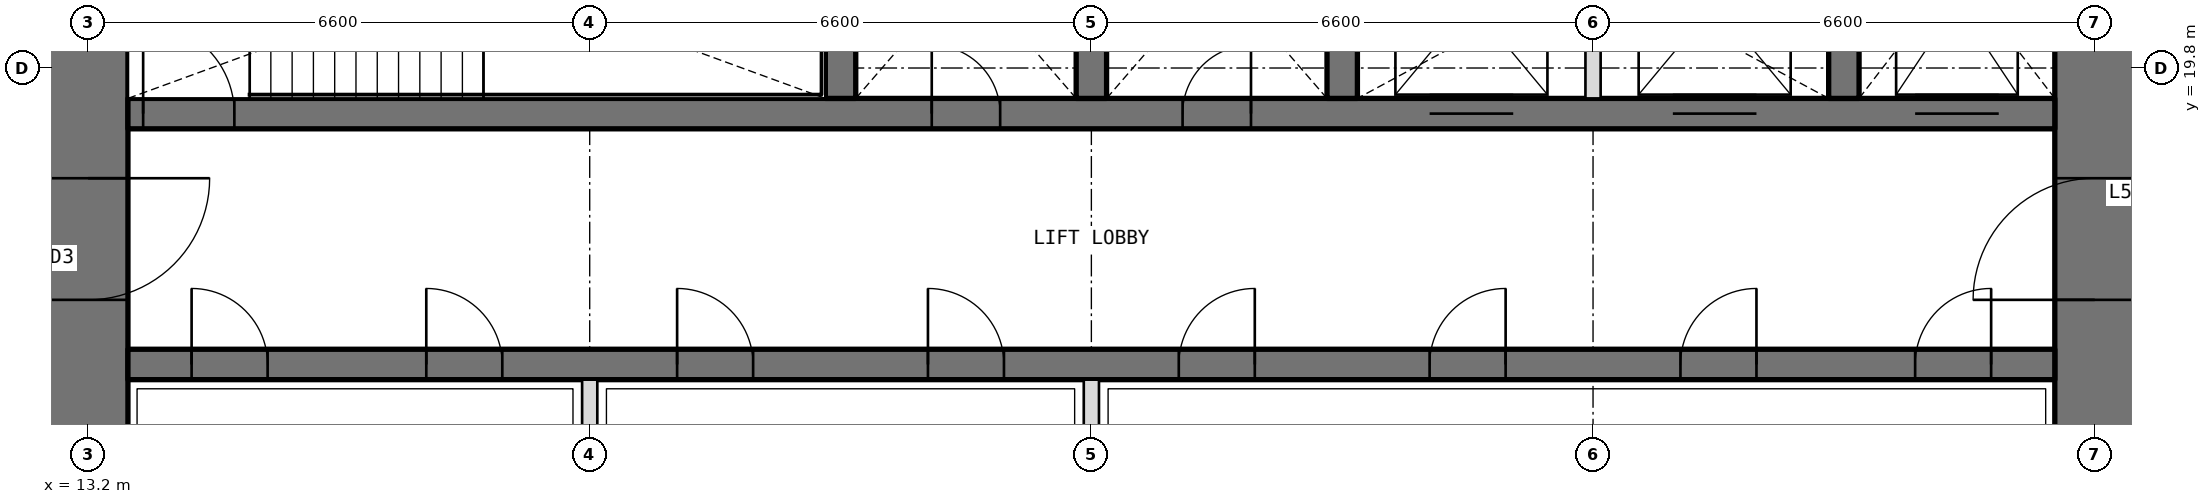
"""IFC4 building model, lengths in metres.
Left out: names, types, materials, properties, quantities, classifications, styles, units other than length and angle.
Written with IfcOpenShell. Run it as: python <this file> out.ifc"""

import sys

from ifc_helpers import new_model, si_unit, direction, frame, frame_2d, origin, place, context, subcontext, project, spatial, rectangle, extrude, element, fill, save


model = new_model("IFC4")
c1 = context("Model", 3, precision=1e-05, world=origin(), true_north=direction((0.0, 1.0)))
c2 = subcontext(c1, "Body", "Model", "MODEL_VIEW")
j1 = project(units=[si_unit("LENGTHUNIT", "METRE"), si_unit("PLANEANGLEUNIT", "RADIAN")], contexts=[c1])
p1 = place(None, origin())
s1 = spatial("IfcSite", under=j1, at=p1, CompositionType="ELEMENT")
p2 = place(p1, origin())
s2 = spatial("IfcBuilding", under=s1, at=p2, CompositionType="ELEMENT")
p3 = place(p2, frame((0.0, 0.0, 250.2)))
s3 = spatial("IfcBuildingStorey", under=s2, at=p3, CompositionType="ELEMENT", Elevation=250.2)
p4 = place(p3, frame((39.6, 13.725, 0.0), z_axis=(0.0, 0.0, 1.0), x_axis=(0.0, 1.0, 0.0)))
e1 = element("IfcWall", 1, at=p4, inside=s3, PredefinedType="SHEAR", context=c2, shape_type="SweptSolid", body=[
    extrude(rectangle(XDim=18.75, YDim=1.05, at=frame_2d((9.375, 0.0))), origin(), (0.0, 0.0, 1.0), 4.2),
])
p5 = place(p4, frame((3.025, 0.0, 0.0)))
e2 = element("IfcOpeningElement", 2, at=p5, cuts=e1, PredefinedType="OPENING", context=c2, shape_type="SweptSolid", body=[
    extrude(rectangle(XDim=1.6, YDim=2.1, at=frame_2d((0.8, 1.05))), frame((0.0, 0.535, 0.0), z_axis=(0.0, -1.0, 0.0), x_axis=(1.0, 0.0, 0.0)), (0.0, 0.0, 1.0), 1.07),
])
p6 = place(p4, frame((13.825, 0.0, 0.0)))
e3 = element("IfcOpeningElement", 3, at=p6, cuts=e1, PredefinedType="OPENING", context=c2, shape_type="SweptSolid", body=[
    extrude(rectangle(XDim=1.6, YDim=2.1, at=frame_2d((0.8, 1.05))), frame((0.0, 0.535, 0.0), z_axis=(0.0, -1.0, 0.0), x_axis=(1.0, 0.0, 0.0)), (0.0, 0.0, 1.0), 1.07),
])
p7 = place(p3, frame((13.2, 32.475, 0.0), z_axis=(0.0, 0.0, 1.0), x_axis=(0.0, -1.0, 0.0)))
e4 = element("IfcWall", 4, at=p7, inside=s3, PredefinedType="SHEAR", context=c2, shape_type="SweptSolid", body=[
    extrude(rectangle(XDim=18.75, YDim=1.05, at=frame_2d((9.375, 0.0))), origin(), (0.0, 0.0, 1.0), 4.2),
])
p8 = place(p7, frame((14.125, 0.0, 0.0)))
e5 = element("IfcOpeningElement", 5, at=p8, cuts=e4, PredefinedType="OPENING", context=c2, shape_type="SweptSolid", body=[
    extrude(rectangle(XDim=1.6, YDim=2.1, at=frame_2d((0.8, 1.05))), frame((0.0, 0.535, 0.0), z_axis=(0.0, -1.0, 0.0), x_axis=(1.0, 0.0, 0.0)), (0.0, 0.0, 1.0), 1.07),
])
p9 = place(p7, frame((3.325, 0.0, 0.0)))
e6 = element("IfcOpeningElement", 6, at=p9, cuts=e4, PredefinedType="OPENING", context=c2, shape_type="SweptSolid", body=[
    extrude(rectangle(XDim=1.6, YDim=2.1, at=frame_2d((0.8, 1.05))), frame((0.0, 0.535, 0.0), z_axis=(0.0, -1.0, 0.0), x_axis=(1.0, 0.0, 0.0)), (0.0, 0.0, 1.0), 1.07),
])
p10 = place(p3, frame((13.725, 15.9, 0.0), z_axis=(0.0, 0.0, 1.0), x_axis=(1.0, 0.0, 0.0)))
e7 = element("IfcWall", 7, at=p10, inside=s3, PredefinedType="SHEAR", context=c2, shape_type="SweptSolid", body=[
    extrude(rectangle(XDim=25.35, YDim=0.4, at=frame_2d((12.675, 0.0))), origin(), (0.0, 0.0, 1.0), 4.2),
])
p11 = place(p10, frame((0.837, 0.0, 0.0)))
e8 = element("IfcOpeningElement", 8, at=p11, cuts=e7, PredefinedType="OPENING", context=c2, shape_type="SweptSolid", body=[
    extrude(rectangle(XDim=1.0, YDim=2.1, at=frame_2d((0.5, 1.05))), frame((0.0, 0.21, 0.0), z_axis=(0.0, -1.0, 0.0), x_axis=(1.0, 0.0, 0.0)), (0.0, 0.0, 1.0), 0.42),
])
p12 = place(p10, frame((3.925, 0.0, 0.0)))
e9 = element("IfcOpeningElement", 9, at=p12, cuts=e7, PredefinedType="OPENING", context=c2, shape_type="SweptSolid", body=[
    extrude(rectangle(XDim=1.0, YDim=2.1, at=frame_2d((0.5, 1.05))), frame((0.0, 0.21, 0.0), z_axis=(0.0, -1.0, 0.0), x_axis=(1.0, 0.0, 0.0)), (0.0, 0.0, 1.0), 0.42),
])
p13 = place(p10, frame((7.225, 0.0, 0.0)))
e10 = element("IfcOpeningElement", 10, at=p13, cuts=e7, PredefinedType="OPENING", context=c2, shape_type="SweptSolid", body=[
    extrude(rectangle(XDim=1.0, YDim=2.1, at=frame_2d((0.5, 1.05))), frame((0.0, 0.21, 0.0), z_axis=(0.0, -1.0, 0.0), x_axis=(1.0, 0.0, 0.0)), (0.0, 0.0, 1.0), 0.42),
])
p14 = place(p10, frame((10.525, 0.0, 0.0)))
e11 = element("IfcOpeningElement", 11, at=p14, cuts=e7, PredefinedType="OPENING", context=c2, shape_type="SweptSolid", body=[
    extrude(rectangle(XDim=1.0, YDim=2.1, at=frame_2d((0.5, 1.05))), frame((0.0, 0.21, 0.0), z_axis=(0.0, -1.0, 0.0), x_axis=(1.0, 0.0, 0.0)), (0.0, 0.0, 1.0), 0.42),
])
p15 = place(p10, frame((13.825, 0.0, 0.0)))
e12 = element("IfcOpeningElement", 12, at=p15, cuts=e7, PredefinedType="OPENING", context=c2, shape_type="SweptSolid", body=[
    extrude(rectangle(XDim=1.0, YDim=2.1, at=frame_2d((0.5, 1.05))), frame((0.0, 0.21, 0.0), z_axis=(0.0, -1.0, 0.0), x_axis=(1.0, 0.0, 0.0)), (0.0, 0.0, 1.0), 0.42),
])
p16 = place(p10, frame((17.125, 0.0, 0.0)))
e13 = element("IfcOpeningElement", 13, at=p16, cuts=e7, PredefinedType="OPENING", context=c2, shape_type="SweptSolid", body=[
    extrude(rectangle(XDim=1.0, YDim=2.1, at=frame_2d((0.5, 1.05))), frame((0.0, 0.21, 0.0), z_axis=(0.0, -1.0, 0.0), x_axis=(1.0, 0.0, 0.0)), (0.0, 0.0, 1.0), 0.42),
])
p17 = place(p10, frame((20.425, 0.0, 0.0)))
e14 = element("IfcOpeningElement", 14, at=p17, cuts=e7, PredefinedType="OPENING", context=c2, shape_type="SweptSolid", body=[
    extrude(rectangle(XDim=1.0, YDim=2.1, at=frame_2d((0.5, 1.05))), frame((0.0, 0.21, 0.0), z_axis=(0.0, -1.0, 0.0), x_axis=(1.0, 0.0, 0.0)), (0.0, 0.0, 1.0), 0.42),
])
p18 = place(p10, frame((23.512, 0.0, 0.0)))
e15 = element("IfcOpeningElement", 15, at=p18, cuts=e7, PredefinedType="OPENING", context=c2, shape_type="SweptSolid", body=[
    extrude(rectangle(XDim=1.0, YDim=2.1, at=frame_2d((0.5, 1.05))), frame((0.0, 0.21, 0.0), z_axis=(0.0, -1.0, 0.0), x_axis=(1.0, 0.0, 0.0)), (0.0, 0.0, 1.0), 0.42),
])
p19 = place(p3, frame((13.725, 19.2, 0.0), z_axis=(0.0, 0.0, 1.0), x_axis=(1.0, 0.0, 0.0)))
e16 = element("IfcWall", 16, at=p19, inside=s3, PredefinedType="SHEAR", context=c2, shape_type="SweptSolid", body=[
    extrude(rectangle(XDim=25.35, YDim=0.4, at=frame_2d((12.675, 0.0))), origin(), (0.0, 0.0, 1.0), 4.2),
])
p20 = place(p19, frame((10.575, 0.0, 0.0)))
e17 = element("IfcOpeningElement", 17, at=p20, cuts=e16, PredefinedType="OPENING", context=c2, shape_type="SweptSolid", body=[
    extrude(rectangle(XDim=0.9, YDim=2.1, at=frame_2d((0.45, 1.05))), frame((0.0, 0.21, 0.0), z_axis=(0.0, -1.0, 0.0), x_axis=(1.0, 0.0, 0.0)), (0.0, 0.0, 1.0), 0.42),
])
p21 = place(p19, frame((13.875, 0.0, 0.0)))
e18 = element("IfcOpeningElement", 18, at=p21, cuts=e16, PredefinedType="OPENING", context=c2, shape_type="SweptSolid", body=[
    extrude(rectangle(XDim=0.9, YDim=2.1, at=frame_2d((0.45, 1.05))), frame((0.0, 0.21, 0.0), z_axis=(0.0, -1.0, 0.0), x_axis=(1.0, 0.0, 0.0)), (0.0, 0.0, 1.0), 0.42),
])
p22 = place(p19, frame((0.2, 0.0, 0.0)))
e19 = element("IfcOpeningElement", 19, at=p22, cuts=e16, PredefinedType="OPENING", context=c2, shape_type="SweptSolid", body=[
    extrude(rectangle(XDim=1.2, YDim=2.1, at=frame_2d((0.6, 1.05))), frame((0.0, 0.21, 0.0), z_axis=(0.0, -1.0, 0.0), x_axis=(1.0, 0.0, 0.0)), (0.0, 0.0, 1.0), 0.42),
])
p23 = place(p19, frame((23.512, 0.0, 0.0)))
e20 = element("IfcOpeningElement", 20, at=p23, cuts=e16, PredefinedType="OPENING", context=c2, shape_type="SweptSolid", body=[
    extrude(rectangle(XDim=1.1, YDim=2.1, at=frame_2d((0.55, 1.05))), frame((0.0, 0.21, 0.0), z_axis=(0.0, -1.0, 0.0), x_axis=(1.0, 0.0, 0.0)), (0.0, 0.0, 1.0), 0.42),
])
p24 = place(p19, frame((17.125, 0.0, 0.0)))
e21 = element("IfcOpeningElement", 21, at=p24, cuts=e16, PredefinedType="OPENING", context=c2, shape_type="SweptSolid", body=[
    extrude(rectangle(XDim=1.1, YDim=2.1, at=frame_2d((0.55, 1.05))), frame((0.0, 0.21, 0.0), z_axis=(0.0, -1.0, 0.0), x_axis=(1.0, 0.0, 0.0)), (0.0, 0.0, 1.0), 0.42),
])
p25 = place(p19, frame((20.325, 0.0, 0.0)))
e22 = element("IfcOpeningElement", 22, at=p25, cuts=e16, PredefinedType="OPENING", context=c2, shape_type="SweptSolid", body=[
    extrude(rectangle(XDim=1.1, YDim=2.1, at=frame_2d((0.55, 1.05))), frame((0.0, 0.21, 0.0), z_axis=(0.0, -1.0, 0.0), x_axis=(1.0, 0.0, 0.0)), (0.0, 0.0, 1.0), 0.42),
])
for number, where, z_axis, x_axis in (
    (23, (23.1, 19.4, 0.0), (0.0, 0.0, 1.0), (0.0, 1.0, 0.0)),
    (24, (26.4, 19.4, 0.0), (0.0, 0.0, 1.0), (0.0, 1.0, 0.0)),
    (25, (29.7, 19.4, 0.0), (0.0, 0.0, 1.0), (0.0, 1.0, 0.0)),
    (26, (36.3, 19.4, 0.0), (0.0, 0.0, 1.0), (0.0, 1.0, 0.0)),
):
    element("IfcWall", number, at=place(p3, frame(where, z_axis=z_axis, x_axis=x_axis)), inside=s3, PredefinedType="SHEAR", context=c2, shape_type="SweptSolid", body=[
        extrude(rectangle(XDim=3.35, YDim=0.4, at=frame_2d((1.675, 0.0))), origin(), (0.0, 0.0, 1.0), 4.2),
    ])
for number, where, z_axis, x_axis in (
    (27, (19.8, 13.725, 0.0), (0.0, 0.0, 1.0), (0.0, 1.0, 0.0)),
    (28, (26.4, 13.725, 0.0), (0.0, 0.0, 1.0), (0.0, 1.0, 0.0)),
):
    element("IfcWall", number, at=place(p3, frame(where, z_axis=z_axis, x_axis=x_axis)), inside=s3, PredefinedType="PARTITIONING", context=c2, shape_type="SweptSolid", body=[
        extrude(rectangle(XDim=1.975, YDim=0.2, at=frame_2d((0.987, 0.0))), origin(), (0.0, 0.0, 1.0), 4.2),
    ])
p26 = place(p3, frame((33.0, 19.4, 0.0), z_axis=(0.0, 0.0, 1.0), x_axis=(0.0, 1.0, 0.0)))
e29 = element("IfcWall", 29, at=p26, inside=s3, PredefinedType="PARTITIONING", context=c2, shape_type="SweptSolid", body=[
    extrude(rectangle(XDim=3.35, YDim=0.2, at=frame_2d((1.675, 0.0))), origin(), (0.0, 0.0, 1.0), 4.2),
])
p27 = place(p20, origin())
e30 = element("IfcDoor", 30, at=p27, inside=s3, OperationType="SINGLE_SWING_LEFT", PredefinedType="DOOR", context=c2, shape_type="SweptSolid", body=[
    extrude(rectangle(XDim=0.9, YDim=2.1, at=frame_2d((0.45, 1.05))), frame((0.0, 0.025, 0.0), z_axis=(0.0, -1.0, 0.0), x_axis=(1.0, 0.0, 0.0)), (0.0, 0.0, 1.0), 0.05),
])
fill(e17, e30)
p28 = place(p21, origin())
e31 = element("IfcDoor", 31, at=p28, inside=s3, OperationType="SINGLE_SWING_RIGHT", PredefinedType="DOOR", context=c2, shape_type="SweptSolid", body=[
    extrude(rectangle(XDim=0.9, YDim=2.1, at=frame_2d((0.45, 1.05))), frame((0.0, 0.025, 0.0), z_axis=(0.0, -1.0, 0.0), x_axis=(1.0, 0.0, 0.0)), (0.0, 0.0, 1.0), 0.05),
])
fill(e18, e31)
p29 = place(p11, origin())
e32 = element("IfcDoor", 32, at=p29, inside=s3, OperationType="SINGLE_SWING_LEFT", PredefinedType="DOOR", context=c2, shape_type="SweptSolid", body=[
    extrude(rectangle(XDim=1.0, YDim=2.1, at=frame_2d((0.5, 1.05))), frame((0.0, 0.025, 0.0), z_axis=(0.0, -1.0, 0.0), x_axis=(1.0, 0.0, 0.0)), (0.0, 0.0, 1.0), 0.05),
])
fill(e8, e32)
p30 = place(p12, origin())
e33 = element("IfcDoor", 33, at=p30, inside=s3, OperationType="SINGLE_SWING_LEFT", PredefinedType="DOOR", context=c2, shape_type="SweptSolid", body=[
    extrude(rectangle(XDim=1.0, YDim=2.1, at=frame_2d((0.5, 1.05))), frame((0.0, 0.025, 0.0), z_axis=(0.0, -1.0, 0.0), x_axis=(1.0, 0.0, 0.0)), (0.0, 0.0, 1.0), 0.05),
])
fill(e9, e33)
p31 = place(p13, origin())
e34 = element("IfcDoor", 34, at=p31, inside=s3, OperationType="SINGLE_SWING_LEFT", PredefinedType="DOOR", context=c2, shape_type="SweptSolid", body=[
    extrude(rectangle(XDim=1.0, YDim=2.1, at=frame_2d((0.5, 1.05))), frame((0.0, 0.025, 0.0), z_axis=(0.0, -1.0, 0.0), x_axis=(1.0, 0.0, 0.0)), (0.0, 0.0, 1.0), 0.05),
])
fill(e10, e34)
p32 = place(p14, origin())
e35 = element("IfcDoor", 35, at=p32, inside=s3, OperationType="SINGLE_SWING_LEFT", PredefinedType="DOOR", context=c2, shape_type="SweptSolid", body=[
    extrude(rectangle(XDim=1.0, YDim=2.1, at=frame_2d((0.5, 1.05))), frame((0.0, 0.025, 0.0), z_axis=(0.0, -1.0, 0.0), x_axis=(1.0, 0.0, 0.0)), (0.0, 0.0, 1.0), 0.05),
])
fill(e11, e35)
p33 = place(p15, origin())
e36 = element("IfcDoor", 36, at=p33, inside=s3, OperationType="SINGLE_SWING_RIGHT", PredefinedType="DOOR", context=c2, shape_type="SweptSolid", body=[
    extrude(rectangle(XDim=1.0, YDim=2.1, at=frame_2d((0.5, 1.05))), frame((0.0, 0.025, 0.0), z_axis=(0.0, -1.0, 0.0), x_axis=(1.0, 0.0, 0.0)), (0.0, 0.0, 1.0), 0.05),
])
fill(e12, e36)
p34 = place(p16, origin())
e37 = element("IfcDoor", 37, at=p34, inside=s3, OperationType="SINGLE_SWING_RIGHT", PredefinedType="DOOR", context=c2, shape_type="SweptSolid", body=[
    extrude(rectangle(XDim=1.0, YDim=2.1, at=frame_2d((0.5, 1.05))), frame((0.0, 0.025, 0.0), z_axis=(0.0, -1.0, 0.0), x_axis=(1.0, 0.0, 0.0)), (0.0, 0.0, 1.0), 0.05),
])
fill(e13, e37)
p35 = place(p17, origin())
e38 = element("IfcDoor", 38, at=p35, inside=s3, OperationType="SINGLE_SWING_RIGHT", PredefinedType="DOOR", context=c2, shape_type="SweptSolid", body=[
    extrude(rectangle(XDim=1.0, YDim=2.1, at=frame_2d((0.5, 1.05))), frame((0.0, 0.025, 0.0), z_axis=(0.0, -1.0, 0.0), x_axis=(1.0, 0.0, 0.0)), (0.0, 0.0, 1.0), 0.05),
])
fill(e14, e38)
p36 = place(p18, origin())
e39 = element("IfcDoor", 39, at=p36, inside=s3, OperationType="SINGLE_SWING_RIGHT", PredefinedType="DOOR", context=c2, shape_type="SweptSolid", body=[
    extrude(rectangle(XDim=1.0, YDim=2.1, at=frame_2d((0.5, 1.05))), frame((0.0, 0.025, 0.0), z_axis=(0.0, -1.0, 0.0), x_axis=(1.0, 0.0, 0.0)), (0.0, 0.0, 1.0), 0.05),
])
fill(e15, e39)
p37 = place(p22, origin())
e40 = element("IfcDoor", 40, at=p37, inside=s3, OperationType="SINGLE_SWING_LEFT", PredefinedType="DOOR", context=c2, shape_type="SweptSolid", body=[
    extrude(rectangle(XDim=1.2, YDim=2.1, at=frame_2d((0.6, 1.05))), frame((0.0, 0.025, 0.0), z_axis=(0.0, -1.0, 0.0), x_axis=(1.0, 0.0, 0.0)), (0.0, 0.0, 1.0), 0.05),
])
fill(e19, e40)
p38 = place(p8, origin())
e41 = element("IfcDoor", 41, at=p38, inside=s3, OperationType="DOUBLE_DOOR_DOUBLE_SWING", PredefinedType="DOOR", context=c2, shape_type="SweptSolid", body=[
    extrude(rectangle(XDim=1.6, YDim=2.1, at=frame_2d((0.8, 1.05))), frame((0.0, 0.025, 0.0), z_axis=(0.0, -1.0, 0.0), x_axis=(1.0, 0.0, 0.0)), (0.0, 0.0, 1.0), 0.05),
])
fill(e5, e41)
p39 = place(p5, origin())
e42 = element("IfcDoor", 42, at=p39, inside=s3, OperationType="DOUBLE_DOOR_DOUBLE_SWING", PredefinedType="DOOR", context=c2, shape_type="SweptSolid", body=[
    extrude(rectangle(XDim=1.6, YDim=2.1, at=frame_2d((0.8, 1.05))), frame((0.0, 0.025, 0.0), z_axis=(0.0, -1.0, 0.0), x_axis=(1.0, 0.0, 0.0)), (0.0, 0.0, 1.0), 0.05),
])
fill(e2, e42)
p40 = place(p23, origin())
e43 = element("IfcDoor", 43, at=p40, inside=s3, OperationType="DOUBLE_DOOR_SLIDING", PredefinedType="DOOR", context=c2, shape_type="SweptSolid", body=[
    extrude(rectangle(XDim=1.1, YDim=2.1, at=frame_2d((0.55, 1.05))), frame((0.0, 0.025, 0.0), z_axis=(0.0, -1.0, 0.0), x_axis=(1.0, 0.0, 0.0)), (0.0, 0.0, 1.0), 0.05),
])
fill(e20, e43)
p41 = place(p24, origin())
e44 = element("IfcDoor", 44, at=p41, inside=s3, OperationType="DOUBLE_DOOR_SLIDING", PredefinedType="DOOR", context=c2, shape_type="SweptSolid", body=[
    extrude(rectangle(XDim=1.1, YDim=2.1, at=frame_2d((0.55, 1.05))), frame((0.0, 0.025, 0.0), z_axis=(0.0, -1.0, 0.0), x_axis=(1.0, 0.0, 0.0)), (0.0, 0.0, 1.0), 0.05),
])
fill(e21, e44)
p42 = place(p25, origin())
e45 = element("IfcDoor", 45, at=p42, inside=s3, OperationType="DOUBLE_DOOR_SLIDING", PredefinedType="DOOR", context=c2, shape_type="SweptSolid", body=[
    extrude(rectangle(XDim=1.1, YDim=2.1, at=frame_2d((0.55, 1.05))), frame((0.0, 0.025, 0.0), z_axis=(0.0, -1.0, 0.0), x_axis=(1.0, 0.0, 0.0)), (0.0, 0.0, 1.0), 0.05),
])
fill(e22, e45)
save(model, sys.argv[1])
